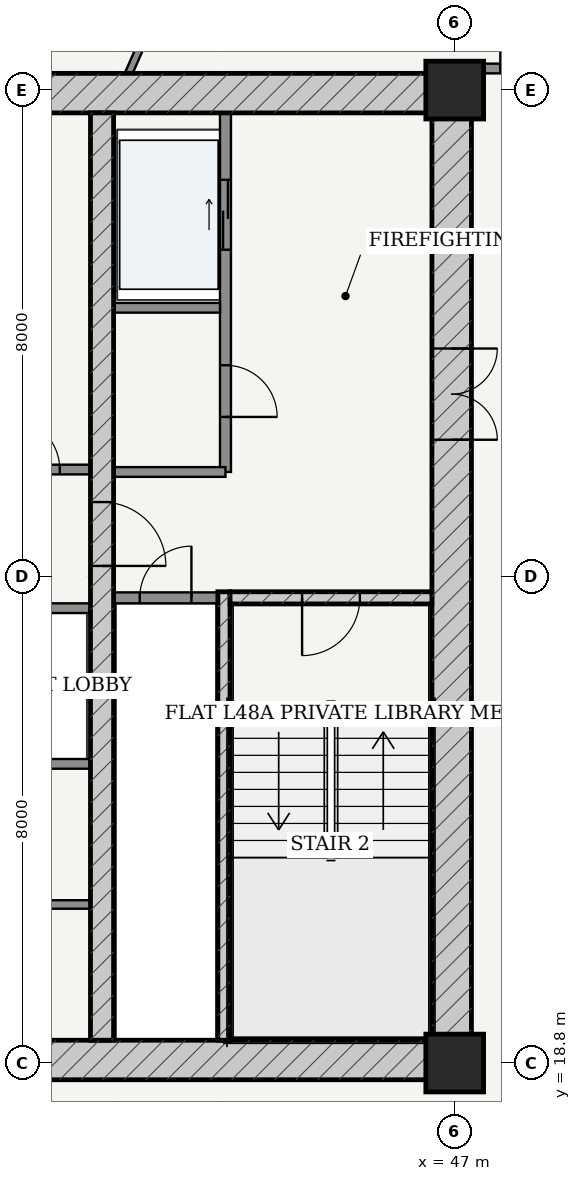
"""IFC4 building model, lengths in metres.
Left out: names, types, materials, properties, quantities, classifications, styles, units other than length and angle.
Written with IfcOpenShell. Run it as: python <this file> out.ifc"""

import sys

from ifc_helpers import new_model, si_unit, direction, frame, frame_2d, origin, origin_2d, place, context, subcontext, project, spatial, rectangle, extrude, source, transform, mapped, element, fill, save


model = new_model("IFC4")
c1 = context("Model", 3, precision=1e-05, world=origin(), true_north=direction((-0.2419218956, 0.970295726276)))
c2 = subcontext(c1, "Body", "Model", "MODEL_VIEW")
j1 = project(units=[si_unit("LENGTHUNIT", "METRE"), si_unit("PLANEANGLEUNIT", "RADIAN")], contexts=[c1])
p1 = place(None, origin())
s1 = spatial("IfcSite", under=j1, at=p1, CompositionType="ELEMENT")
p2 = place(p1, origin())
s2 = spatial("IfcBuilding", under=s1, at=p2, CompositionType="ELEMENT")
p3 = place(p2, frame((0.0, 0.0, 182.2)))
s3 = spatial("IfcBuildingStorey", under=s2, at=p3, CompositionType="ELEMENT", Elevation=182.2)
for number, where, z_axis, x_axis in (
    (1, (47.0, 18.8, 0.0), (0.0, 0.0, 1.0), (1.0, 0.0, 0.0)),
    (2, (47.0, 34.8, 0.0), (0.0, 0.0, 1.0), (1.0, 0.0, 0.0)),
):
    element("IfcColumn", number, at=place(p3, frame(where, z_axis=z_axis, x_axis=x_axis)), inside=s3, PredefinedType="COLUMN", context=c2, shape_type="SweptSolid", body=[
        extrude(rectangle(XDim=0.95, YDim=0.95, at=origin_2d()), origin(), (0.0, 0.0, 1.0), 3.6),
    ])
p4 = place(p3, frame((28.725, 18.85, 0.0), z_axis=(0.0, 0.0, 1.0), x_axis=(1.0, 0.0, 0.0)))
e3 = element("IfcWall", 3, at=p4, inside=s3, PredefinedType="SHEAR", context=c2, shape_type="SweptSolid", body=[
    extrude(rectangle(XDim=18.55, YDim=0.65, at=frame_2d((9.275, 0.0))), origin(), (0.0, 0.0, 1.0), 3.15),
])
p5 = place(p4, frame((7.51, 0.0, 0.0)))
e4 = element("IfcOpeningElement", 4, at=p5, cuts=e3, PredefinedType="OPENING", context=c2, shape_type="SweptSolid", body=[
    extrude(rectangle(XDim=0.85, YDim=2.1, at=frame_2d((0.425, 1.05))), frame((0.0, 0.335, 0.0), z_axis=(0.0, -1.0, 0.0), x_axis=(1.0, 0.0, 0.0)), (0.0, 0.0, 1.0), 0.67),
])
p6 = place(p4, frame((10.59, 0.0, 0.0)))
e5 = element("IfcOpeningElement", 5, at=p6, cuts=e3, PredefinedType="OPENING", context=c2, shape_type="SweptSolid", body=[
    extrude(rectangle(XDim=0.85, YDim=2.1, at=frame_2d((0.425, 1.05))), frame((0.0, 0.335, 0.0), z_axis=(0.0, -1.0, 0.0), x_axis=(1.0, 0.0, 0.0)), (0.0, 0.0, 1.0), 0.67),
])
p7 = place(p3, frame((28.725, 34.75, 0.0), z_axis=(0.0, 0.0, 1.0), x_axis=(1.0, 0.0, 0.0)))
e6 = element("IfcWall", 6, at=p7, inside=s3, PredefinedType="SHEAR", context=c2, shape_type="SweptSolid", body=[
    extrude(rectangle(XDim=18.55, YDim=0.65, at=frame_2d((9.275, 0.0))), origin(), (0.0, 0.0, 1.0), 3.15),
])
p8 = place(p3, frame((46.95, 19.175, 0.0), z_axis=(0.0, 0.0, 1.0), x_axis=(0.0, 1.0, 0.0)))
e7 = element("IfcWall", 7, at=p8, inside=s3, PredefinedType="SHEAR", context=c2, shape_type="SweptSolid", body=[
    extrude(rectangle(XDim=15.25, YDim=0.65, at=frame_2d((7.625, 0.0))), origin(), (0.0, 0.0, 1.0), 3.15),
])
p9 = place(p8, frame((9.875, 0.0, 0.0)))
e8 = element("IfcOpeningElement", 8, at=p9, cuts=e7, PredefinedType="OPENING", context=c2, shape_type="SweptSolid", body=[
    extrude(rectangle(XDim=1.5, YDim=2.2, at=frame_2d((0.75, 1.1))), frame((0.0, 0.335, 0.0), z_axis=(0.0, -1.0, 0.0), x_axis=(1.0, 0.0, 0.0)), (0.0, 0.0, 1.0), 0.67),
])
p10 = place(p3, frame((43.205, 19.175, 0.0), z_axis=(0.0, 0.0, 1.0), x_axis=(0.0, 1.0, 0.0)))
e9 = element("IfcWall", 9, at=p10, inside=s3, PredefinedType="SOLIDWALL", context=c2, shape_type="SweptSolid", body=[
    extrude(rectangle(XDim=7.375, YDim=0.2, at=frame_2d((3.688, 0.0))), origin(), (0.0, 0.0, 1.0), 3.15),
])
p11 = place(p3, frame((43.305, 26.45, 0.0), z_axis=(0.0, 0.0, 1.0), x_axis=(1.0, 0.0, 0.0)))
e10 = element("IfcWall", 10, at=p11, inside=s3, PredefinedType="SOLIDWALL", context=c2, shape_type="SweptSolid", body=[
    extrude(rectangle(XDim=3.32, YDim=0.2, at=frame_2d((1.66, 0.0))), origin(), (0.0, 0.0, 1.0), 3.15),
])
p12 = place(p11, frame((1.185, 0.0, 0.0)))
e11 = element("IfcOpeningElement", 11, at=p12, cuts=e10, PredefinedType="OPENING", context=c2, shape_type="SweptSolid", body=[
    extrude(rectangle(XDim=0.95, YDim=2.15, at=frame_2d((0.475, 1.075))), frame((0.0, 0.11, 0.0), z_axis=(0.0, -1.0, 0.0), x_axis=(1.0, 0.0, 0.0)), (0.0, 0.0, 1.0), 0.22),
])
p13 = place(p3, frame((41.2, 19.175, 0.0), z_axis=(0.0, 0.0, 1.0), x_axis=(0.0, 1.0, 0.0)))
e12 = element("IfcWall", 12, at=p13, inside=s3, PredefinedType="SHEAR", context=c2, shape_type="SweptSolid", body=[
    extrude(rectangle(XDim=15.25, YDim=0.38, at=frame_2d((7.625, 0.0))), origin(), (0.0, 0.0, 1.0), 3.15),
])
p14 = place(p13, frame((7.8, 0.0, 0.0)))
e13 = element("IfcOpeningElement", 13, at=p14, cuts=e12, PredefinedType="OPENING", context=c2, shape_type="SweptSolid", body=[
    extrude(rectangle(XDim=1.05, YDim=2.15, at=frame_2d((0.525, 1.075))), frame((0.0, 0.2, 0.0), z_axis=(0.0, -1.0, 0.0), x_axis=(1.0, 0.0, 0.0)), (0.0, 0.0, 1.0), 0.4),
])
p15 = place(p3, frame((41.39, 26.45, 0.0), z_axis=(0.0, 0.0, 1.0), x_axis=(1.0, 0.0, 0.0)))
e14 = element("IfcWall", 14, at=p15, inside=s3, PredefinedType="PARTITIONING", context=c2, shape_type="SweptSolid", body=[
    extrude(rectangle(XDim=1.71, YDim=0.18, at=frame_2d((0.855, 0.0))), origin(), (0.0, 0.0, 1.0), 3.15),
])
p16 = place(p15, frame((0.43, 0.0, 0.0)))
e15 = element("IfcOpeningElement", 15, at=p16, cuts=e14, PredefinedType="OPENING", context=c2, shape_type="SweptSolid", body=[
    extrude(rectangle(XDim=0.85, YDim=2.1, at=frame_2d((0.425, 1.05))), frame((0.0, 0.1, 0.0), z_axis=(0.0, -1.0, 0.0), x_axis=(1.0, 0.0, 0.0)), (0.0, 0.0, 1.0), 0.2),
])
p17 = place(p3, frame((43.23, 28.52, 0.0), z_axis=(0.0, 0.0, 1.0), x_axis=(0.0, 1.0, 0.0)))
e16 = element("IfcWall", 16, at=p17, inside=s3, PredefinedType="PARTITIONING", context=c2, shape_type="SweptSolid", body=[
    extrude(rectangle(XDim=5.905, YDim=0.18, at=frame_2d((2.953, 0.0))), origin(), (0.0, 0.0, 1.0), 3.15),
])
p18 = place(p17, frame((0.905, 0.0, 0.0)))
e17 = element("IfcOpeningElement", 17, at=p18, cuts=e16, PredefinedType="OPENING", context=c2, shape_type="SweptSolid", body=[
    extrude(rectangle(XDim=0.85, YDim=2.1, at=frame_2d((0.425, 1.05))), frame((0.0, 0.1, 0.0), z_axis=(0.0, -1.0, 0.0), x_axis=(1.0, 0.0, 0.0)), (0.0, 0.0, 1.0), 0.2),
])
p19 = place(p17, frame((3.655, 0.0, 0.0)))
e18 = element("IfcOpeningElement", 18, at=p19, cuts=e16, PredefinedType="OPENING", context=c2, shape_type="SweptSolid", body=[
    extrude(rectangle(XDim=1.15, YDim=2.2, at=frame_2d((0.575, 1.1))), frame((0.0, 0.1, 0.0), z_axis=(0.0, -1.0, 0.0), x_axis=(1.0, 0.0, 0.0)), (0.0, 0.0, 1.0), 0.2),
])
p20 = place(p3, frame((41.39, 31.22, 0.0), z_axis=(0.0, 0.0, 1.0), x_axis=(1.0, 0.0, 0.0)))
e19 = element("IfcWall", 19, at=p20, inside=s3, PredefinedType="PARTITIONING", context=c2, shape_type="SweptSolid", body=[
    extrude(rectangle(XDim=1.75, YDim=0.16, at=frame_2d((0.875, 0.0))), origin(), (0.0, 0.0, 1.0), 3.15),
])
p21 = place(p3, frame((41.39, 28.52, 0.0), z_axis=(0.0, 0.0, 1.0), x_axis=(1.0, 0.0, 0.0)))
e20 = element("IfcWall", 20, at=p21, inside=s3, PredefinedType="PARTITIONING", context=c2, shape_type="SweptSolid", body=[
    extrude(rectangle(XDim=1.84, YDim=0.16, at=frame_2d((0.92, 0.0))), origin(), (0.0, 0.0, 1.0), 3.15),
])
p22 = place(p3, frame((34.99, 28.56, 0.0), z_axis=(0.0, 0.0, 1.0), x_axis=(1.0, 0.0, 0.0)))
e21 = element("IfcWall", 21, at=p22, inside=s3, PredefinedType="PARTITIONING", context=c2, shape_type="SweptSolid", body=[
    extrude(rectangle(XDim=6.02, YDim=0.16, at=frame_2d((3.01, 0.0))), origin(), (0.0, 0.0, 1.0), 3.15),
])
p23 = place(p22, frame((0.505, 0.0, 0.0)))
e22 = element("IfcOpeningElement", 22, at=p23, cuts=e21, PredefinedType="OPENING", context=c2, shape_type="SweptSolid", body=[
    extrude(rectangle(XDim=0.85, YDim=2.1, at=frame_2d((0.425, 1.05))), frame((0.0, 0.09, 0.0), z_axis=(0.0, -1.0, 0.0), x_axis=(1.0, 0.0, 0.0)), (0.0, 0.0, 1.0), 0.18),
])
p24 = place(p22, frame((2.58, 0.0, 0.0)))
e23 = element("IfcOpeningElement", 23, at=p24, cuts=e21, PredefinedType="OPENING", context=c2, shape_type="SweptSolid", body=[
    extrude(rectangle(XDim=0.86, YDim=2.1, at=frame_2d((0.43, 1.05))), frame((0.0, 0.09, 0.0), z_axis=(0.0, -1.0, 0.0), x_axis=(1.0, 0.0, 0.0)), (0.0, 0.0, 1.0), 0.18),
])
p25 = place(p22, frame((4.665, 0.0, 0.0)))
e24 = element("IfcOpeningElement", 24, at=p25, cuts=e21, PredefinedType="OPENING", context=c2, shape_type="SweptSolid", body=[
    extrude(rectangle(XDim=0.85, YDim=2.1, at=frame_2d((0.425, 1.05))), frame((0.0, 0.09, 0.0), z_axis=(0.0, -1.0, 0.0), x_axis=(1.0, 0.0, 0.0)), (0.0, 0.0, 1.0), 0.18),
])
p26 = place(p3, frame((34.99, 26.28, 0.0), z_axis=(0.0, 0.0, 1.0), x_axis=(1.0, 0.0, 0.0)))
e25 = element("IfcWall", 25, at=p26, inside=s3, PredefinedType="PARTITIONING", context=c2, shape_type="SweptSolid", body=[
    extrude(rectangle(XDim=6.02, YDim=0.16, at=frame_2d((3.01, 0.0))), origin(), (0.0, 0.0, 1.0), 3.15),
])
p27 = place(p26, frame((0.225, 0.0, 0.0)))
e26 = element("IfcOpeningElement", 26, at=p27, cuts=e25, PredefinedType="OPENING", context=c2, shape_type="SweptSolid", body=[
    extrude(rectangle(XDim=1.1, YDim=2.2, at=frame_2d((0.55, 1.1))), frame((0.0, 0.09, 0.0), z_axis=(0.0, -1.0, 0.0), x_axis=(1.0, 0.0, 0.0)), (0.0, 0.0, 1.0), 0.18),
])
p28 = place(p26, frame((1.705, 0.0, 0.0)))
e27 = element("IfcOpeningElement", 27, at=p28, cuts=e25, PredefinedType="OPENING", context=c2, shape_type="SweptSolid", body=[
    extrude(rectangle(XDim=1.1, YDim=2.2, at=frame_2d((0.55, 1.1))), frame((0.0, 0.09, 0.0), z_axis=(0.0, -1.0, 0.0), x_axis=(1.0, 0.0, 0.0)), (0.0, 0.0, 1.0), 0.18),
])
p29 = place(p3, frame((34.99, 23.72, 0.0), z_axis=(0.0, 0.0, 1.0), x_axis=(1.0, 0.0, 0.0)))
e28 = element("IfcWall", 28, at=p29, inside=s3, PredefinedType="PARTITIONING", context=c2, shape_type="SweptSolid", body=[
    extrude(rectangle(XDim=6.02, YDim=0.16, at=frame_2d((3.01, 0.0))), origin(), (0.0, 0.0, 1.0), 3.15),
])
p30 = place(p3, frame((38.4, 21.407, 0.0), z_axis=(0.0, 0.0, 1.0), x_axis=(1.0, 0.0, 0.0)))
e29 = element("IfcWall", 29, at=p30, inside=s3, PredefinedType="PARTITIONING", context=c2, shape_type="SweptSolid", body=[
    extrude(rectangle(XDim=2.61, YDim=0.14, at=frame_2d((1.305, 0.0))), origin(), (0.0, 0.0, 1.0), 3.15),
])
p31 = place(p30, frame((0.88, 0.0, 0.0)))
e30 = element("IfcOpeningElement", 30, at=p31, cuts=e29, PredefinedType="OPENING", context=c2, shape_type="SweptSolid", body=[
    extrude(rectangle(XDim=0.85, YDim=2.1, at=frame_2d((0.425, 1.05))), frame((0.0, 0.08, 0.0), z_axis=(0.0, -1.0, 0.0), x_axis=(1.0, 0.0, 0.0)), (0.0, 0.0, 1.0), 0.16),
])
p32 = place(p3, frame((47.275, 35.155, 0.0), z_axis=(0.0, 0.0, 1.0), x_axis=(1.0, 0.0, 0.0)))
e31 = element("IfcWall", 31, at=p32, inside=s3, PredefinedType="PARTITIONING", context=c2, shape_type="SweptSolid", body=[
    extrude(rectangle(XDim=1.93, YDim=0.16, at=frame_2d((0.965, 0.0))), origin(), (0.0, 0.0, 1.0), 3.15),
])
p33 = place(p32, frame((0.475, 0.0, 0.0)))
e32 = element("IfcOpeningElement", 32, at=p33, cuts=e31, PredefinedType="OPENING", context=c2, shape_type="SweptSolid", body=[
    extrude(rectangle(XDim=0.98, YDim=2.2, at=frame_2d((0.49, 1.1))), frame((0.0, 0.09, 0.0), z_axis=(0.0, -1.0, 0.0), x_axis=(1.0, 0.0, 0.0)), (0.0, 0.0, 1.0), 0.18),
])
p34 = place(p3, frame((41.638, 35.075, 0.0), z_axis=(0.0, 0.0, 1.0), x_axis=(0.402456087228, 0.915439292282, 0.0)))
e33 = element("IfcWall", 33, at=p34, inside=s3, PredefinedType="PARTITIONING", context=c2, shape_type="SweptSolid", body=[
    extrude(rectangle(XDim=3.128, YDim=0.12, at=frame_2d((1.564, 0.0))), origin(), (0.0, 0.0, 1.0), 3.15),
])
p35 = place(p34, frame((1.114, 0.0, 0.0)))
e34 = element("IfcOpeningElement", 34, at=p35, cuts=e33, PredefinedType="OPENING", context=c2, shape_type="SweptSolid", body=[
    extrude(rectangle(XDim=0.9, YDim=2.15, at=frame_2d((0.45, 1.075))), frame((0.0, 0.07, 0.0), z_axis=(0.0, -1.0, 0.0), x_axis=(1.0, 0.0, 0.0)), (0.0, 0.0, 1.0), 0.14),
])
m1 = source(origin(), c2, "Body", "SweptSolid", [
    extrude(rectangle(XDim=1.5, YDim=2.2, at=frame_2d((0.75, 1.1))), frame((0.0, 0.025, 0.0), z_axis=(0.0, -1.0, 0.0), x_axis=(1.0, 0.0, 0.0)), (0.0, 0.0, 1.0), 0.05),
])
p36 = place(p9, frame((1.5, 0.0, 0.0), z_axis=(0.0, 0.0, 1.0), x_axis=(-1.0, 0.0, 0.0)))
e35 = element("IfcDoor", 35, at=p36, inside=s3, OperationType="DOUBLE_DOOR_SINGLE_SWING", PredefinedType="DOOR", context=c2, shape_type="MappedRepresentation", body=[
    mapped(m1, transform((0.0, 0.0, 0.0), scale=1.0)),
])
fill(e8, e35)
m2 = source(origin(), c2, "Body", "SweptSolid", [
    extrude(rectangle(XDim=1.05, YDim=2.15, at=frame_2d((0.525, 1.075))), frame((0.0, 0.025, 0.0), z_axis=(0.0, -1.0, 0.0), x_axis=(1.0, 0.0, 0.0)), (0.0, 0.0, 1.0), 0.05),
])
p37 = place(p14, frame((1.05, 0.0, 0.0), z_axis=(0.0, 0.0, 1.0), x_axis=(-1.0, 0.0, 0.0)))
e36 = element("IfcDoor", 36, at=p37, inside=s3, OperationType="SINGLE_SWING_RIGHT", PredefinedType="DOOR", context=c2, shape_type="MappedRepresentation", body=[
    mapped(m2, transform((0.0, 0.0, 0.0), scale=1.0)),
])
fill(e13, e36)
m3 = source(origin(), c2, "Body", "SweptSolid", [
    extrude(rectangle(XDim=0.95, YDim=2.15, at=frame_2d((0.475, 1.075))), frame((0.0, 0.025, 0.0), z_axis=(0.0, -1.0, 0.0), x_axis=(1.0, 0.0, 0.0)), (0.0, 0.0, 1.0), 0.05),
])
p38 = place(p12, frame((0.95, 0.0, 0.0), z_axis=(0.0, 0.0, 1.0), x_axis=(-1.0, 0.0, 0.0)))
e37 = element("IfcDoor", 37, at=p38, inside=s3, OperationType="SINGLE_SWING_RIGHT", PredefinedType="DOOR", context=c2, shape_type="MappedRepresentation", body=[
    mapped(m3, transform((0.0, 0.0, 0.0), scale=1.0)),
])
fill(e11, e37)
m4 = source(origin(), c2, "Body", "SweptSolid", [
    extrude(rectangle(XDim=0.85, YDim=2.1, at=frame_2d((0.425, 1.05))), frame((0.0, 0.025, 0.0), z_axis=(0.0, -1.0, 0.0), x_axis=(1.0, 0.0, 0.0)), (0.0, 0.0, 1.0), 0.05),
])
p39 = place(p16, origin())
e38 = element("IfcDoor", 38, at=p39, inside=s3, OperationType="SINGLE_SWING_RIGHT", PredefinedType="DOOR", context=c2, shape_type="MappedRepresentation", body=[
    mapped(m4, transform((0.0, 0.0, 0.0), scale=1.0)),
])
fill(e15, e38)
p40 = place(p18, frame((0.85, 0.0, 0.0), z_axis=(0.0, 0.0, 1.0), x_axis=(-1.0, 0.0, 0.0)))
e39 = element("IfcDoor", 39, at=p40, inside=s3, OperationType="SINGLE_SWING_RIGHT", PredefinedType="DOOR", context=c2, shape_type="MappedRepresentation", body=[
    mapped(m4, transform((0.0, 0.0, 0.0), scale=1.0)),
])
fill(e17, e39)
p41 = place(p25, origin())
e40 = element("IfcDoor", 40, at=p41, inside=s3, OperationType="SINGLE_SWING_LEFT", PredefinedType="DOOR", context=c2, shape_type="MappedRepresentation", body=[
    mapped(m4, transform((0.0, 0.0, 0.0), scale=1.0)),
])
fill(e24, e40)
m5 = source(origin(), c2, "Body", "SweptSolid", [
    extrude(rectangle(XDim=1.15, YDim=2.2, at=frame_2d((0.575, 1.1))), frame((0.0, 0.025, 0.0), z_axis=(0.0, -1.0, 0.0), x_axis=(1.0, 0.0, 0.0)), (0.0, 0.0, 1.0), 0.05),
])
p42 = place(p19, origin())
e41 = element("IfcDoor", 41, at=p42, inside=s3, OperationType="DOUBLE_DOOR_SLIDING", PredefinedType="DOOR", context=c2, shape_type="MappedRepresentation", body=[
    mapped(m5, transform((0.0, 0.0, 0.0), scale=1.0)),
])
fill(e18, e41)
m6 = source(origin(), c2, "Body", "SweptSolid", [
    extrude(rectangle(XDim=0.98, YDim=2.2, at=frame_2d((0.49, 1.1))), frame((0.0, 0.025, 0.0), z_axis=(0.0, -1.0, 0.0), x_axis=(1.0, 0.0, 0.0)), (0.0, 0.0, 1.0), 0.05),
])
p43 = place(p33, origin())
e42 = element("IfcDoor", 42, at=p43, inside=s3, OperationType="SINGLE_SWING_LEFT", PredefinedType="DOOR", context=c2, shape_type="MappedRepresentation", body=[
    mapped(m6, transform((0.0, 0.0, 0.0), scale=1.0)),
])
fill(e32, e42)
save(model, sys.argv[1])
